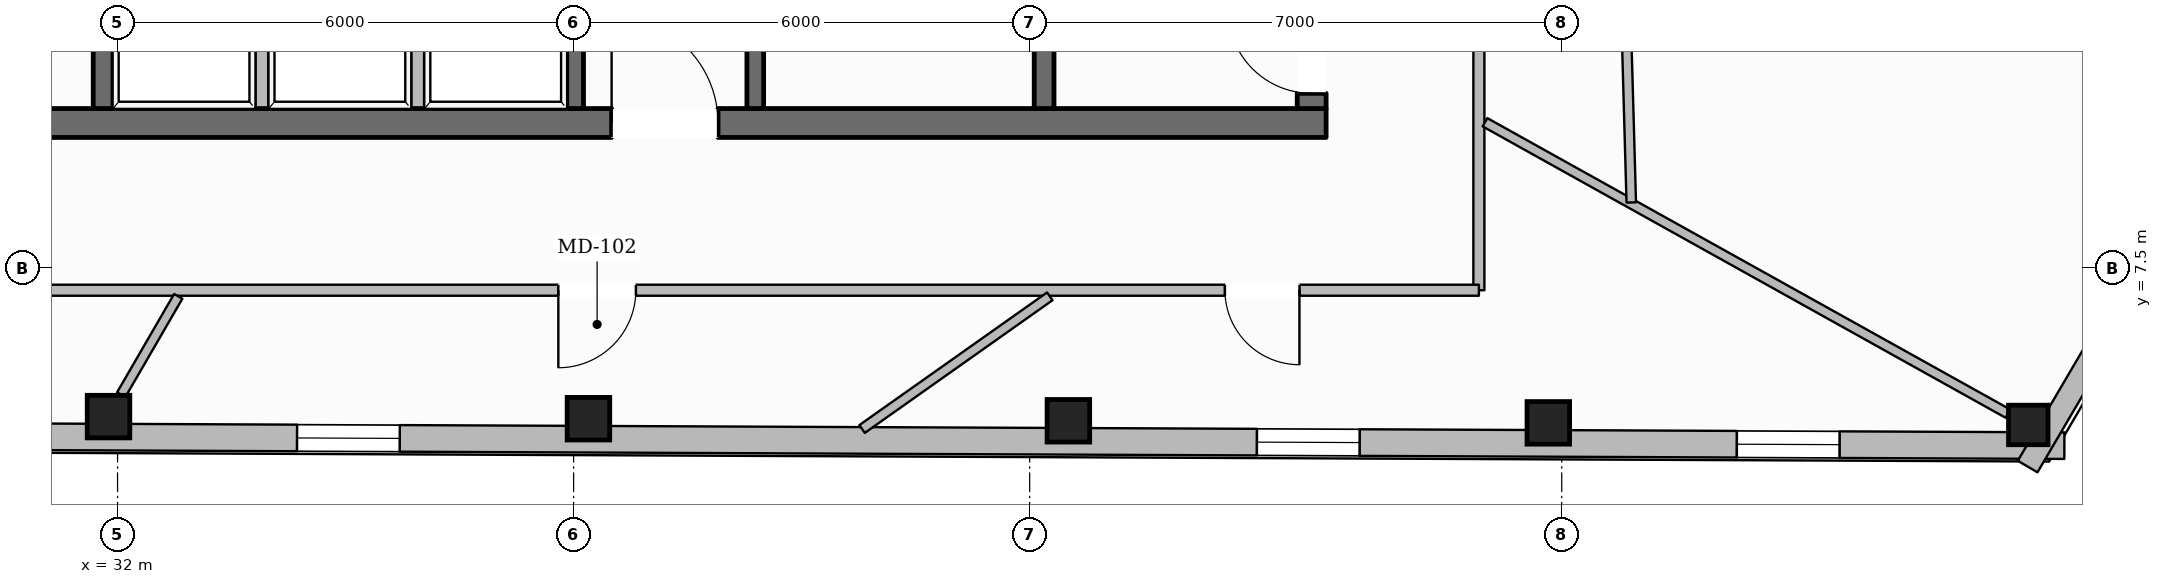
"""IFC4 building model, lengths in metres.
Left out: names, types, materials, properties, quantities, classifications, styles, units other than length and angle.
Written with IfcOpenShell. Run it as: python <this file> out.ifc"""

import sys

from ifc_helpers import new_model, si_unit, direction, frame, frame_2d, origin, origin_2d, place, context, subcontext, project, spatial, rectangle, hollow_rectangle, extrude, element, fill, save


model = new_model("IFC4")
c1 = context("Model", 3, precision=1e-05, world=origin(), true_north=direction((0.0, 1.0)))
c2 = subcontext(c1, "Body", "Model", "MODEL_VIEW")
j1 = project(units=[si_unit("LENGTHUNIT", "METRE"), si_unit("PLANEANGLEUNIT", "RADIAN")], contexts=[c1])
p1 = place(None, origin())
s1 = spatial("IfcSite", under=j1, at=p1, CompositionType="ELEMENT")
p2 = place(p1, origin())
s2 = spatial("IfcBuilding", under=s1, at=p2, CompositionType="ELEMENT")
p3 = place(p2, frame((0.0, 0.0, 270.3)))
s3 = spatial("IfcBuildingStorey", under=s2, at=p3, CompositionType="ELEMENT", Elevation=270.3)
p4 = place(p3, frame((28.1, 9.41, 0.0), z_axis=(0.0, 0.0, 1.0), x_axis=(1.0, 0.0, 0.0)))
e1 = element("IfcWall", 1, at=p4, inside=s3, PredefinedType="SOLIDWALL", context=c2, shape_type="SweptSolid", body=[
    extrude(rectangle(XDim=19.8, YDim=0.38, at=frame_2d((9.9, 0.0))), origin(), (0.0, 0.0, 1.0), 3.61),
])
p5 = place(p4, frame((10.4, 0.0, 0.0)))
e2 = element("IfcOpeningElement", 2, at=p5, cuts=e1, PredefinedType="OPENING", context=c2, shape_type="SweptSolid", body=[
    extrude(rectangle(XDim=1.4, YDim=2.2, at=frame_2d((0.7, 1.1))), frame((0.0, 0.2, 0.0), z_axis=(0.0, -1.0, 0.0), x_axis=(1.0, 0.0, 0.0)), (0.0, 0.0, 1.0), 0.4),
])
p6 = place(p3, frame((47.71, 9.6, 0.0), z_axis=(0.0, 0.0, 1.0), x_axis=(0.0, 1.0, 0.0)))
e3 = element("IfcWall", 3, at=p6, inside=s3, PredefinedType="SOLIDWALL", context=c2, shape_type="SweptSolid", body=[
    extrude(rectangle(XDim=13.0, YDim=0.38, at=frame_2d((6.5, 0.0))), origin(), (0.0, 0.0, 1.0), 3.61),
])
p7 = place(p6, frame((0.2, 0.0, 0.0)))
e4 = element("IfcOpeningElement", 4, at=p7, cuts=e3, PredefinedType="OPENING", context=c2, shape_type="SweptSolid", body=[
    extrude(rectangle(XDim=1.1, YDim=2.15, at=frame_2d((0.55, 1.075))), frame((0.0, 0.2, 0.0), z_axis=(0.0, -1.0, 0.0), x_axis=(1.0, 0.0, 0.0)), (0.0, 0.0, 1.0), 0.4),
])
p8 = place(p6, frame((8.4, 0.0, 0.0)))
e5 = element("IfcOpeningElement", 5, at=p8, cuts=e3, PredefinedType="OPENING", context=c2, shape_type="SweptSolid", body=[
    extrude(rectangle(XDim=0.9, YDim=2.1, at=frame_2d((0.45, 1.05))), frame((0.0, 0.2, 0.0), z_axis=(0.0, -1.0, 0.0), x_axis=(1.0, 0.0, 0.0)), (0.0, 0.0, 1.0), 0.4),
])
p9 = place(p3, frame((31.81, 9.6, 0.0), z_axis=(0.0, 0.0, 1.0), x_axis=(0.0, 1.0, 0.0)))
e6 = element("IfcWall", 6, at=p9, inside=s3, PredefinedType="SHEAR", context=c2, shape_type="SweptSolid", body=[
    extrude(rectangle(XDim=13.0, YDim=0.26, at=frame_2d((6.5, 0.0))), origin(), (0.0, 0.0, 1.0), 3.61),
])
p10 = place(p9, frame((10.925, 0.0, 0.0)))
e7 = element("IfcOpeningElement", 7, at=p10, cuts=e6, PredefinedType="OPENING", context=c2, shape_type="SweptSolid", body=[
    extrude(rectangle(XDim=1.25, YDim=2.25, at=frame_2d((0.625, 1.125))), frame((0.0, 0.14, 0.0), z_axis=(0.0, -1.0, 0.0), x_axis=(1.0, 0.0, 0.0)), (0.0, 0.0, 1.0), 0.28),
])
p11 = place(p3, frame((44.19, 9.6, 0.0), z_axis=(0.0, 0.0, 1.0), x_axis=(0.0, 1.0, 0.0)))
e8 = element("IfcWall", 8, at=p11, inside=s3, PredefinedType="SHEAR", context=c2, shape_type="SweptSolid", body=[
    extrude(rectangle(XDim=13.0, YDim=0.26, at=frame_2d((6.5, 0.0))), origin(), (0.0, 0.0, 1.0), 3.61),
])
p12 = place(p11, frame((10.925, 0.0, 0.0)))
e9 = element("IfcOpeningElement", 9, at=p12, cuts=e8, PredefinedType="OPENING", context=c2, shape_type="SweptSolid", body=[
    extrude(rectangle(XDim=1.25, YDim=2.25, at=frame_2d((0.625, 1.125))), frame((0.0, 0.14, 0.0), z_axis=(0.0, -1.0, 0.0), x_axis=(1.0, 0.0, 0.0)), (0.0, 0.0, 1.0), 0.28),
])
for number, where, z_axis, x_axis in (
    (10, (38.02, 9.6, 0.0), (0.0, 0.0, 1.0), (0.0, 1.0, 0.0)),
    (11, (40.39, 9.6, 0.0), (0.0, 0.0, 1.0), (0.0, 1.0, 0.0)),
):
    element("IfcWall", number, at=place(p3, frame(where, z_axis=z_axis, x_axis=x_axis)), inside=s3, PredefinedType="SOLIDWALL", context=c2, shape_type="SweptSolid", body=[
        extrude(rectangle(XDim=2.24, YDim=0.22, at=frame_2d((1.12, 0.0))), origin(), (0.0, 0.0, 1.0), 3.61),
    ])
for number, where, z_axis, x_axis in (
    (12, (31.881, 5.547, 0.0), (0.0, 0.0, 1.0), (1.0, 0.0, 0.0)),
    (13, (38.195, 5.52, 0.0), (0.0, 0.0, 1.0), (1.0, 0.0, 0.0)),
    (14, (44.51, 5.492, 0.0), (0.0, 0.0, 1.0), (1.0, 0.0, 0.0)),
    (15, (50.823, 5.465, 0.0), (0.0, 0.0, 1.0), (1.0, 0.0, 0.0)),
):
    element("IfcColumn", number, at=place(p3, frame(where, z_axis=z_axis, x_axis=x_axis)), inside=s3, PredefinedType="COLUMN", context=c2, shape_type="SweptSolid", body=[
        extrude(hollow_rectangle(XDim=0.56, YDim=0.56, WallThickness=0.025, at=origin_2d()), origin(), (0.0, 0.0, 1.0), 3.61),
    ])
p13 = place(p3, frame((57.138, 5.438, 0.0), z_axis=(0.0, 0.0, 1.0), x_axis=(1.0, 0.0, 0.0)))
e16 = element("IfcColumn", 16, at=p13, inside=s3, PredefinedType="COLUMN", context=c2, shape_type="SweptSolid", body=[
    extrude(hollow_rectangle(XDim=0.52, YDim=0.52, WallThickness=0.024, at=origin_2d()), origin(), (0.0, 0.0, 1.0), 3.61),
])
p14 = place(p3, frame((57.613, 5.165, 0.0), z_axis=(0.0, 0.0, 1.0), x_axis=(-0.99999050908, 0.004356805123, 0.0)))
e17 = element("IfcWall", 17, at=p14, inside=s3, PredefinedType="STANDARD", context=c2, shape_type="SweptSolid", body=[
    extrude(rectangle(XDim=38.833, YDim=0.35, at=frame_2d((19.417, 0.0))), origin(), (0.0, 0.0, 1.0), 3.196),
])
p15 = place(p14, frame((34.529, 0.0, 0.65)))
e18 = element("IfcOpeningElement", 18, at=p15, cuts=e17, PredefinedType="OPENING", context=c2, shape_type="SweptSolid", body=[
    extrude(rectangle(XDim=1.35, YDim=1.75, at=frame_2d((0.675, 0.875))), frame((0.0, 0.185, 0.0), z_axis=(0.0, -1.0, 0.0), x_axis=(1.0, 0.0, 0.0)), (0.0, 0.0, 1.0), 0.37),
])
p16 = place(p14, frame((28.215, 0.0, 0.65)))
e19 = element("IfcOpeningElement", 19, at=p16, cuts=e17, PredefinedType="OPENING", context=c2, shape_type="SweptSolid", body=[
    extrude(rectangle(XDim=1.35, YDim=1.75, at=frame_2d((0.675, 0.875))), frame((0.0, 0.185, 0.0), z_axis=(0.0, -1.0, 0.0), x_axis=(1.0, 0.0, 0.0)), (0.0, 0.0, 1.0), 0.37),
])
p17 = place(p14, frame((21.901, 0.0, 0.65)))
e20 = element("IfcOpeningElement", 20, at=p17, cuts=e17, PredefinedType="OPENING", context=c2, shape_type="SweptSolid", body=[
    extrude(rectangle(XDim=1.35, YDim=1.75, at=frame_2d((0.675, 0.875))), frame((0.0, 0.185, 0.0), z_axis=(0.0, -1.0, 0.0), x_axis=(1.0, 0.0, 0.0)), (0.0, 0.0, 1.0), 0.37),
])
p18 = place(p14, frame((9.272, 0.0, 0.65)))
e21 = element("IfcOpeningElement", 21, at=p18, cuts=e17, PredefinedType="OPENING", context=c2, shape_type="SweptSolid", body=[
    extrude(rectangle(XDim=1.35, YDim=1.75, at=frame_2d((0.675, 0.875))), frame((0.0, 0.185, 0.0), z_axis=(0.0, -1.0, 0.0), x_axis=(1.0, 0.0, 0.0)), (0.0, 0.0, 1.0), 0.37),
])
p19 = place(p14, frame((2.958, 0.0, 0.65)))
e22 = element("IfcOpeningElement", 22, at=p19, cuts=e17, PredefinedType="OPENING", context=c2, shape_type="SweptSolid", body=[
    extrude(rectangle(XDim=1.35, YDim=1.75, at=frame_2d((0.675, 0.875))), frame((0.0, 0.185, 0.0), z_axis=(0.0, -1.0, 0.0), x_axis=(1.0, 0.0, 0.0)), (0.0, 0.0, 1.0), 0.37),
])
p20 = place(p3, frame((60.654, 10.897, 0.0), z_axis=(0.0, 0.0, 1.0), x_axis=(-0.506109881411, -0.862469006943, 0.0)))
e23 = element("IfcWall", 23, at=p20, inside=s3, PredefinedType="STANDARD", context=c2, shape_type="SweptSolid", body=[
    extrude(rectangle(XDim=6.965, YDim=0.3, at=frame_2d((3.482, 0.0))), origin(), (0.0, 0.0, 1.0), 3.196),
])
p21 = place(p20, frame((2.957, 0.0, 0.65)))
e24 = element("IfcOpeningElement", 24, at=p21, cuts=e23, PredefinedType="OPENING", context=c2, shape_type="SweptSolid", body=[
    extrude(rectangle(XDim=1.05, YDim=1.7, at=frame_2d((0.525, 0.85))), frame((0.0, 0.16, 0.0), z_axis=(0.0, -1.0, 0.0), x_axis=(1.0, 0.0, 0.0)), (0.0, 0.0, 1.0), 0.32),
])
p22 = place(p3, frame((41.09, 43.352, 0.0), z_axis=(0.0, 0.0, 1.0), x_axis=(0.509850521087, -0.860263009868, 0.0)))
e25 = element("IfcWall", 25, at=p22, inside=s3, PredefinedType="STANDARD", context=c2, shape_type="SweptSolid", body=[
    extrude(rectangle(XDim=38.375, YDim=0.35, at=frame_2d((19.188, 0.0))), origin(), (0.0, 0.0, 1.0), 3.196),
])
p23 = place(p22, frame((28.181, 0.0, 0.0)))
e26 = element("IfcOpeningElement", 26, at=p23, cuts=e25, PredefinedType="OPENING", context=c2, shape_type="SweptSolid", body=[
    extrude(rectangle(XDim=1.0, YDim=2.2, at=frame_2d((0.5, 1.1))), frame((0.0, 0.185, 0.0), z_axis=(0.0, -1.0, 0.0), x_axis=(1.0, 0.0, 0.0)), (0.0, 0.0, 1.0), 0.37),
])
p24 = place(p22, frame((34.098, 0.0, 0.65)))
e27 = element("IfcOpeningElement", 27, at=p24, cuts=e25, PredefinedType="OPENING", context=c2, shape_type="SweptSolid", body=[
    extrude(rectangle(XDim=1.35, YDim=1.75, at=frame_2d((0.675, 0.875))), frame((0.0, 0.185, 0.0), z_axis=(0.0, -1.0, 0.0), x_axis=(1.0, 0.0, 0.0)), (0.0, 0.0, 1.0), 0.37),
])
p25 = place(p22, frame((21.625, 0.0, 0.65)))
e28 = element("IfcOpeningElement", 28, at=p25, cuts=e25, PredefinedType="OPENING", context=c2, shape_type="SweptSolid", body=[
    extrude(rectangle(XDim=1.35, YDim=1.75, at=frame_2d((0.675, 0.875))), frame((0.0, 0.185, 0.0), z_axis=(0.0, -1.0, 0.0), x_axis=(1.0, 0.0, 0.0)), (0.0, 0.0, 1.0), 0.37),
])
p26 = place(p22, frame((9.152, 0.0, 0.65)))
e29 = element("IfcOpeningElement", 29, at=p26, cuts=e25, PredefinedType="OPENING", context=c2, shape_type="SweptSolid", body=[
    extrude(rectangle(XDim=1.35, YDim=1.75, at=frame_2d((0.675, 0.875))), frame((0.0, 0.185, 0.0), z_axis=(0.0, -1.0, 0.0), x_axis=(1.0, 0.0, 0.0)), (0.0, 0.0, 1.0), 0.37),
])
p27 = place(p22, frame((2.915, 0.0, 0.65)))
e30 = element("IfcOpeningElement", 30, at=p27, cuts=e25, PredefinedType="OPENING", context=c2, shape_type="SweptSolid", body=[
    extrude(rectangle(XDim=1.35, YDim=1.75, at=frame_2d((0.675, 0.875))), frame((0.0, 0.185, 0.0), z_axis=(0.0, -1.0, 0.0), x_axis=(1.0, 0.0, 0.0)), (0.0, 0.0, 1.0), 0.37),
])
for number, where, z_axis, x_axis in (
    (31, (33.9, 9.49, 0.0), (0.0, 0.0, 1.0), (0.0, 1.0, 0.0)),
    (32, (35.95, 9.49, 0.0), (0.0, 0.0, 1.0), (0.0, 1.0, 0.0)),
):
    element("IfcWall", number, at=place(p3, frame(where, z_axis=z_axis, x_axis=x_axis)), inside=s3, PredefinedType="PARTITIONING", context=c2, shape_type="SweptSolid", body=[
        extrude(rectangle(XDim=2.35, YDim=0.165, at=frame_2d((1.175, 0.0))), origin(), (0.0, 0.0, 1.0), 3.61),
    ])
p28 = place(p3, frame((49.91, 12.15, 0.0), z_axis=(0.0, 0.0, 1.0), x_axis=(0.0, -1.0, 0.0)))
e33 = element("IfcWall", 33, at=p28, inside=s3, PredefinedType="PARTITIONING", context=c2, shape_type="SweptSolid", body=[
    extrude(rectangle(XDim=4.94, YDim=0.145, at=frame_2d((2.47, 0.0))), origin(), (0.0, 0.0, 1.0), 3.61),
])
p29 = place(p3, frame((49.91, 7.21, 0.0), z_axis=(0.0, 0.0, 1.0), x_axis=(-1.0, 0.0, 0.0)))
e34 = element("IfcWall", 34, at=p29, inside=s3, PredefinedType="PARTITIONING", context=c2, shape_type="SweptSolid", body=[
    extrude(rectangle(XDim=23.82, YDim=0.145, at=frame_2d((11.91, 0.0))), origin(), (0.0, 0.0, 1.0), 3.61),
])
p30 = place(p29, frame((20.093, 0.0, 0.0)))
e35 = element("IfcOpeningElement", 35, at=p30, cuts=e34, PredefinedType="OPENING", context=c2, shape_type="SweptSolid", body=[
    extrude(rectangle(XDim=0.98, YDim=2.15, at=frame_2d((0.49, 1.075))), frame((0.0, 0.083, 0.0), z_axis=(0.0, -1.0, 0.0), x_axis=(1.0, 0.0, 0.0)), (0.0, 0.0, 1.0), 0.165),
])
p31 = place(p29, frame((11.091, 0.0, 0.0)))
e36 = element("IfcOpeningElement", 36, at=p31, cuts=e34, PredefinedType="OPENING", context=c2, shape_type="SweptSolid", body=[
    extrude(rectangle(XDim=1.02, YDim=2.15, at=frame_2d((0.51, 1.075))), frame((0.0, 0.083, 0.0), z_axis=(0.0, -1.0, 0.0), x_axis=(1.0, 0.0, 0.0)), (0.0, 0.0, 1.0), 0.165),
])
p32 = place(p29, frame((2.361, 0.0, 0.0)))
e37 = element("IfcOpeningElement", 37, at=p32, cuts=e34, PredefinedType="OPENING", context=c2, shape_type="SweptSolid", body=[
    extrude(rectangle(XDim=0.98, YDim=2.15, at=frame_2d((0.49, 1.075))), frame((0.0, 0.083, 0.0), z_axis=(0.0, -1.0, 0.0), x_axis=(1.0, 0.0, 0.0)), (0.0, 0.0, 1.0), 0.165),
])
p33 = place(p3, frame((32.799, 7.129, 0.0), z_axis=(0.0, 0.0, 1.0), x_axis=(-0.501718089772, -0.865031189262, 0.0)))
e38 = element("IfcWall", 38, at=p33, inside=s3, PredefinedType="PARTITIONING", context=c2, shape_type="SweptSolid", body=[
    extrude(rectangle(XDim=1.496, YDim=0.125, at=frame_2d((0.748, 0.0))), origin(), (0.0, 0.0, 1.0), 3.61),
])
p34 = place(p3, frame((49.99, 9.419, 0.0), z_axis=(0.0, 0.0, 1.0), x_axis=(0.873576073391, -0.486687624662, 0.0)))
e39 = element("IfcWall", 39, at=p34, inside=s3, PredefinedType="PARTITIONING", context=c2, shape_type="SweptSolid", body=[
    extrude(rectangle(XDim=7.875, YDim=0.125, at=frame_2d((3.938, 0.0))), origin(), (0.0, 0.0, 1.0), 3.246),
])
p35 = place(p3, frame((51.915, 8.365, 0.0), z_axis=(0.0, 0.0, 1.0), x_axis=(-0.028169991023, 0.999603147057, 0.0)))
e40 = element("IfcWall", 40, at=p35, inside=s3, PredefinedType="PARTITIONING", context=c2, shape_type="SweptSolid", body=[
    extrude(rectangle(XDim=17.255, YDim=0.125, at=frame_2d((8.628, 0.0))), origin(), (0.0, 0.0, 1.0), 3.199),
])
p36 = place(p35, frame((8.259, 0.0, 0.0)))
e41 = element("IfcOpeningElement", 41, at=p36, cuts=e40, PredefinedType="OPENING", context=c2, shape_type="SweptSolid", body=[
    extrude(rectangle(XDim=0.98, YDim=2.15, at=frame_2d((0.49, 1.075))), frame((0.0, 0.073, 0.0), z_axis=(0.0, -1.0, 0.0), x_axis=(1.0, 0.0, 0.0)), (0.0, 0.0, 1.0), 0.145),
])
p37 = place(p3, frame((41.795, 5.384, 0.0), z_axis=(0.0, 0.0, 1.0), x_axis=(0.816663444244, 0.577114216456, 0.0)))
e42 = element("IfcWall", 42, at=p37, inside=s3, PredefinedType="PARTITIONING", context=c2, shape_type="SweptSolid", body=[
    extrude(rectangle(XDim=3.024, YDim=0.125, at=frame_2d((1.512, 0.0))), origin(), (0.0, 0.0, 1.0), 3.61),
])
p38 = place(p17, origin())
e43 = element("IfcWindow", 43, at=p38, inside=s3, PartitioningType="SINGLE_PANEL", PredefinedType="WINDOW", context=c2, shape_type="SweptSolid", body=[
    extrude(rectangle(XDim=1.35, YDim=1.75, at=frame_2d((0.675, 0.875))), frame((0.0, 0.03, 0.0), z_axis=(0.0, -1.0, 0.0), x_axis=(1.0, 0.0, 0.0)), (0.0, 0.0, 1.0), 0.06),
])
fill(e20, e43)
p39 = place(p18, origin())
e44 = element("IfcWindow", 44, at=p39, inside=s3, PartitioningType="SINGLE_PANEL", PredefinedType="WINDOW", context=c2, shape_type="SweptSolid", body=[
    extrude(rectangle(XDim=1.35, YDim=1.75, at=frame_2d((0.675, 0.875))), frame((0.0, 0.03, 0.0), z_axis=(0.0, -1.0, 0.0), x_axis=(1.0, 0.0, 0.0)), (0.0, 0.0, 1.0), 0.06),
])
fill(e21, e44)
p40 = place(p19, origin())
e45 = element("IfcWindow", 45, at=p40, inside=s3, PartitioningType="SINGLE_PANEL", PredefinedType="WINDOW", context=c2, shape_type="SweptSolid", body=[
    extrude(rectangle(XDim=1.35, YDim=1.75, at=frame_2d((0.675, 0.875))), frame((0.0, 0.03, 0.0), z_axis=(0.0, -1.0, 0.0), x_axis=(1.0, 0.0, 0.0)), (0.0, 0.0, 1.0), 0.06),
])
fill(e22, e45)
p41 = place(p7, origin())
e46 = element("IfcDoor", 46, at=p41, inside=s3, OperationType="SINGLE_SWING_RIGHT", PredefinedType="DOOR", context=c2, shape_type="SweptSolid", body=[
    extrude(rectangle(XDim=1.1, YDim=2.15, at=frame_2d((0.55, 1.075))), frame((0.0, 0.025, 0.0), z_axis=(0.0, -1.0, 0.0), x_axis=(1.0, 0.0, 0.0)), (0.0, 0.0, 1.0), 0.05),
])
fill(e4, e46)
p42 = place(p5, origin())
e47 = element("IfcDoor", 47, at=p42, inside=s3, OperationType="SINGLE_SWING_LEFT", PredefinedType="DOOR", context=c2, shape_type="SweptSolid", body=[
    extrude(rectangle(XDim=1.4, YDim=2.2, at=frame_2d((0.7, 1.1))), frame((0.0, 0.025, 0.0), z_axis=(0.0, -1.0, 0.0), x_axis=(1.0, 0.0, 0.0)), (0.0, 0.0, 1.0), 0.05),
])
fill(e2, e47)
p43 = place(p31, origin())
e48 = element("IfcDoor", 48, at=p43, inside=s3, OperationType="SINGLE_SWING_RIGHT", PredefinedType="DOOR", context=c2, shape_type="SweptSolid", body=[
    extrude(rectangle(XDim=1.02, YDim=2.15, at=frame_2d((0.51, 1.075))), frame((0.0, 0.025, 0.0), z_axis=(0.0, -1.0, 0.0), x_axis=(1.0, 0.0, 0.0)), (0.0, 0.0, 1.0), 0.05),
])
fill(e36, e48)
p44 = place(p32, origin())
e49 = element("IfcDoor", 49, at=p44, inside=s3, OperationType="SINGLE_SWING_LEFT", PredefinedType="DOOR", context=c2, shape_type="SweptSolid", body=[
    extrude(rectangle(XDim=0.98, YDim=2.15, at=frame_2d((0.49, 1.075))), frame((0.0, 0.025, 0.0), z_axis=(0.0, -1.0, 0.0), x_axis=(1.0, 0.0, 0.0)), (0.0, 0.0, 1.0), 0.05),
])
fill(e37, e49)
save(model, sys.argv[1])
